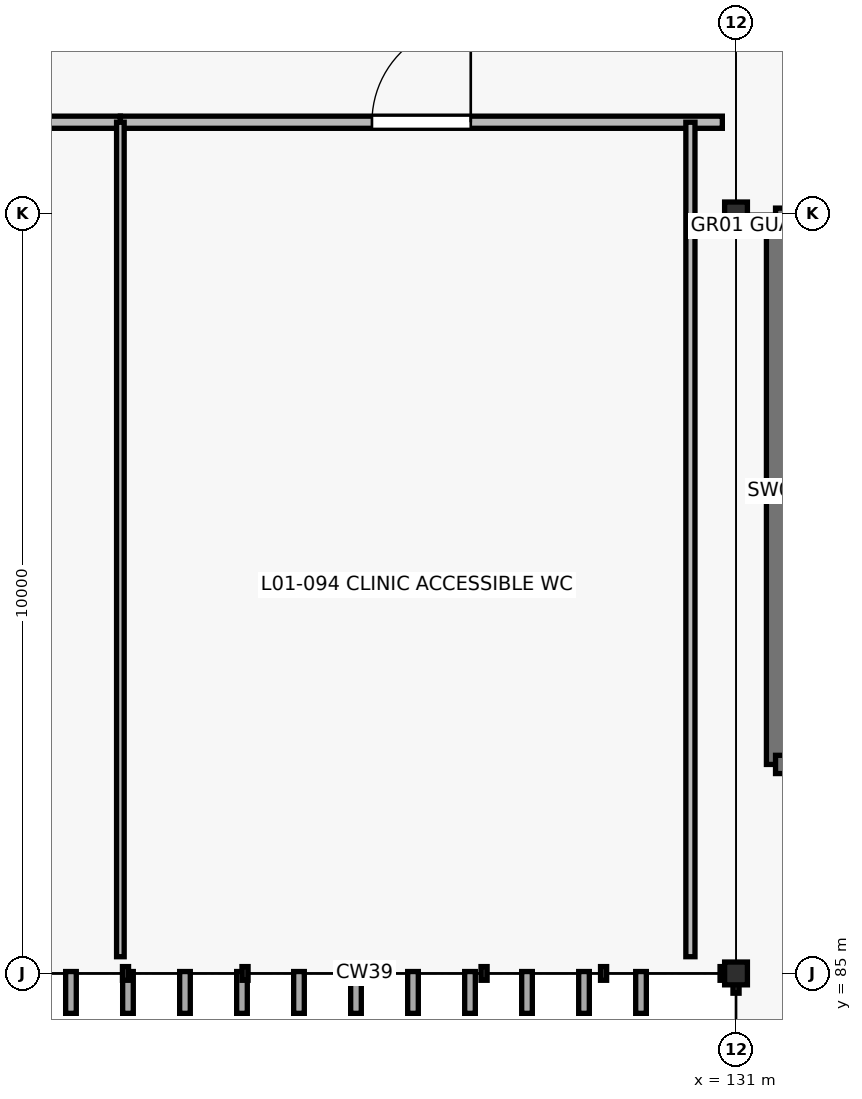
"""IFC4 building model, lengths in metres.
Left out: names, types, materials, properties, quantities, classifications, styles, units other than length and angle.
Written with IfcOpenShell. Run it as: python <this file> out.ifc"""

import sys

from ifc_helpers import new_model, si_unit, direction, frame, frame_2d, origin, origin_2d, place, context, subcontext, project, spatial, rectangle, i_section, extrude, element, fill, save


model = new_model("IFC4")
c1 = context("Model", 3, precision=1e-05, world=origin(), true_north=direction((0.0, 1.0)))
c2 = subcontext(c1, "Body", "Model", "MODEL_VIEW")
j1 = project(units=[si_unit("LENGTHUNIT", "METRE"), si_unit("PLANEANGLEUNIT", "RADIAN")], contexts=[c1])
p1 = place(None, origin())
s1 = spatial("IfcSite", under=j1, at=p1, CompositionType="ELEMENT")
p2 = place(p1, origin())
s2 = spatial("IfcBuilding", under=s1, at=p2, CompositionType="ELEMENT")
p3 = place(p2, frame((0.0, 0.0, 4.8)))
s3 = spatial("IfcBuildingStorey", under=s2, at=p3, CompositionType="ELEMENT", Elevation=4.8)
for number, where, z_axis, x_axis in (
    (1, (131.0, 85.0, 0.0), (0.0, 0.0, 1.0), (1.0, 0.0, 0.0)),
    (2, (131.0, 95.0, 0.0), (0.0, 0.0, 1.0), (1.0, 0.0, 0.0)),
):
    element("IfcColumn", number, at=place(p3, frame(where, z_axis=z_axis, x_axis=x_axis)), inside=s3, PredefinedType="COLUMN", context=c2, shape_type="SweptSolid", body=[
        extrude(i_section(OverallWidth=0.3, OverallDepth=0.3, WebThickness=0.011, FlangeThickness=0.019, at=origin_2d()), origin(), (0.0, 0.0, 1.0), 4.2),
    ])
p4 = place(p3, frame((131.52, 87.75, 0.0), z_axis=(0.0, 0.0, 1.0), x_axis=(0.0, 1.0, 0.0)))
e3 = element("IfcWall", 3, at=p4, inside=s3, PredefinedType="SHEAR", context=c2, shape_type="SweptSolid", body=[
    extrude(rectangle(XDim=7.2, YDim=0.24, at=frame_2d((3.6, 0.0))), origin(), (0.0, 0.0, 1.0), 4.2),
])
p5 = place(p3, frame((131.52, 94.95, 0.0), z_axis=(0.0, 0.0, 1.0), x_axis=(1.0, 0.0, 0.0)))
e4 = element("IfcWall", 4, at=p5, inside=s3, PredefinedType="SHEAR", context=c2, shape_type="SweptSolid", body=[
    extrude(rectangle(XDim=4.16, YDim=0.24, at=frame_2d((2.08, 0.0))), origin(), (0.0, 0.0, 1.0), 4.2),
])
p6 = place(p3, frame((131.52, 87.75, 0.0), z_axis=(0.0, 0.0, 1.0), x_axis=(1.0, 0.0, 0.0)))
e5 = element("IfcWall", 5, at=p6, inside=s3, PredefinedType="SHEAR", context=c2, shape_type="SweptSolid", body=[
    extrude(rectangle(XDim=4.16, YDim=0.24, at=frame_2d((2.08, 0.0))), origin(), (0.0, 0.0, 1.0), 4.2),
])
p7 = place(p6, frame((0.35, 0.0, 0.0)))
e6 = element("IfcOpeningElement", 6, at=p7, cuts=e5, PredefinedType="OPENING", context=c2, shape_type="SweptSolid", body=[
    extrude(rectangle(XDim=1.0, YDim=2.15, at=frame_2d((0.5, 1.075))), frame((0.0, 0.13, 0.0), z_axis=(0.0, -1.0, 0.0), x_axis=(1.0, 0.0, 0.0)), (0.0, 0.0, 1.0), 0.26),
])
p8 = place(p3, frame((116.9, 96.2, 0.0), z_axis=(0.0, 0.0, 1.0), x_axis=(1.0, 0.0, 0.0)))
e7 = element("IfcWall", 7, at=p8, inside=s3, PredefinedType="PARTITIONING", context=c2, shape_type="SweptSolid", body=[
    extrude(rectangle(XDim=6.0, YDim=0.16, at=frame_2d((3.0, 0.0))), origin(), (0.0, 0.0, 1.0), 2.925),
])
p9 = place(p8, frame((2.15, 0.0, 0.0)))
e8 = element("IfcOpeningElement", 8, at=p9, cuts=e7, PredefinedType="OPENING", context=c2, shape_type="SweptSolid", body=[
    extrude(rectangle(XDim=1.7, YDim=2.25, at=frame_2d((0.85, 1.125))), frame((0.0, 0.09, 0.0), z_axis=(0.0, -1.0, 0.0), x_axis=(1.0, 0.0, 0.0)), (0.0, 0.0, 1.0), 0.18),
])
p10 = place(p3, frame((122.9, 96.2, 0.0), z_axis=(0.0, 0.0, 1.0), x_axis=(1.0, 0.0, 0.0)))
e9 = element("IfcWall", 9, at=p10, inside=s3, PredefinedType="PARTITIONING", context=c2, shape_type="SweptSolid", body=[
    extrude(rectangle(XDim=7.92, YDim=0.16, at=frame_2d((3.96, 0.0))), origin(), (0.0, 0.0, 1.0), 2.925),
])
p11 = place(p10, frame((3.31, 0.0, 0.0)))
e10 = element("IfcOpeningElement", 10, at=p11, cuts=e9, PredefinedType="OPENING", context=c2, shape_type="SweptSolid", body=[
    extrude(rectangle(XDim=1.3, YDim=2.2, at=frame_2d((0.65, 1.1))), frame((0.0, 0.09, 0.0), z_axis=(0.0, -1.0, 0.0), x_axis=(1.0, 0.0, 0.0)), (0.0, 0.0, 1.0), 0.18),
])
p12 = place(p3, frame((122.9, 85.22, 0.0), z_axis=(0.0, 0.0, 1.0), x_axis=(0.0, 1.0, 0.0)))
e11 = element("IfcWall", 11, at=p12, inside=s3, PredefinedType="PARTITIONING", context=c2, shape_type="SweptSolid", body=[
    extrude(rectangle(XDim=10.98, YDim=0.1, at=frame_2d((5.49, 0.0))), origin(), (0.0, 0.0, 1.0), 3.025),
])
p13 = place(p3, frame((130.4, 85.22, 0.0), z_axis=(0.0, 0.0, 1.0), x_axis=(0.0, 1.0, 0.0)))
e12 = element("IfcWall", 12, at=p13, inside=s3, PredefinedType="PARTITIONING", context=c2, shape_type="SweptSolid", body=[
    extrude(rectangle(XDim=10.98, YDim=0.12, at=frame_2d((5.49, 0.0))), origin(), (0.0, 0.0, 1.0), 3.025),
])
p14 = place(p11, origin())
e13 = element("IfcDoor", 13, at=p14, inside=s3, OperationType="SINGLE_SWING_RIGHT", PredefinedType="DOOR", context=c2, shape_type="SweptSolid", body=[
    extrude(rectangle(XDim=1.3, YDim=2.2, at=frame_2d((0.65, 1.1))), frame((0.0, 0.025, 0.0), z_axis=(0.0, -1.0, 0.0), x_axis=(1.0, 0.0, 0.0)), (0.0, 0.0, 1.0), 0.05),
])
fill(e10, e13)
save(model, sys.argv[1])
